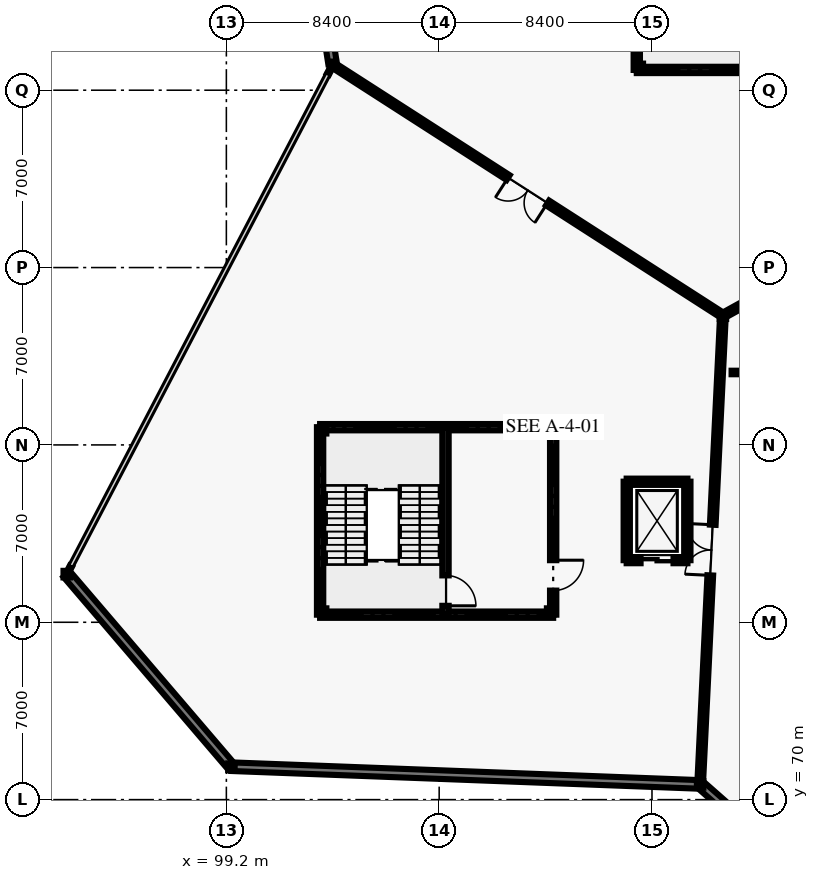
"""IFC4 building model, lengths in metres.
Left out: names, types, materials, properties, quantities, classifications, styles, units other than length and angle.
Written with IfcOpenShell. Run it as: python <this file> out.ifc"""

import sys

from ifc_helpers import new_model, si_unit, direction, frame, frame_2d, origin, origin_2d, place, context, subcontext, project, spatial, rectangle, i_section, extrude, element, fill, save


model = new_model("IFC4")
c1 = context("Model", 3, precision=1e-05, world=origin(), true_north=direction((0.0, 1.0)))
c2 = subcontext(c1, "Body", "Model", "MODEL_VIEW")
j1 = project(units=[si_unit("LENGTHUNIT", "METRE"), si_unit("PLANEANGLEUNIT", "RADIAN")], contexts=[c1])
p1 = place(None, origin())
s1 = spatial("IfcSite", under=j1, at=p1, CompositionType="ELEMENT")
p2 = place(p1, origin())
s2 = spatial("IfcBuilding", under=s1, at=p2, CompositionType="ELEMENT")
p3 = place(p2, frame((0.0, 0.0, 19.8)))
s3 = spatial("IfcBuildingStorey", under=s2, at=p3, CompositionType="ELEMENT", Elevation=19.8)
for number, where, z_axis, x_axis in (
    (1, (92.9, 78.9, 0.0), (0.0, 0.0, 1.0), (1.0, 0.0, 0.0)),
    (2, (99.4, 71.3, 0.0), (0.0, 0.0, 1.0), (1.0, 0.0, 0.0)),
    (3, (103.4, 99.0, 0.0), (0.0, 0.0, 1.0), (1.0, 0.0, 0.0)),
    (4, (117.9, 70.6, 0.0), (0.0, 0.0, 1.0), (1.0, 0.0, 0.0)),
    (5, (118.8, 89.1, 0.0), (0.0, 0.0, 1.0), (1.0, 0.0, 0.0)),
    (6, (103.02, 77.42, 0.0), (0.0, 0.0, 1.0), (1.0, 0.0, 0.0)),
    (7, (111.98, 77.42, 0.0), (0.0, 0.0, 1.0), (1.0, 0.0, 0.0)),
    (8, (111.98, 84.58, 0.0), (0.0, 0.0, 1.0), (1.0, 0.0, 0.0)),
    (9, (103.02, 84.58, 0.0), (0.0, 0.0, 1.0), (1.0, 0.0, 0.0)),
    (10, (115.52, 98.92, 0.0), (0.0, 0.0, 1.0), (1.0, 0.0, 0.0)),
):
    element("IfcColumn", number, at=place(p3, frame(where, z_axis=z_axis, x_axis=x_axis)), inside=s3, PredefinedType="COLUMN", context=c2, shape_type="SweptSolid", body=[
        extrude(i_section(OverallWidth=0.256, OverallDepth=0.26, WebThickness=0.01, FlangeThickness=0.017, FilletRadius=0.013, at=origin_2d()), origin(), (0.0, 0.0, 1.0), 9.0),
    ])
p4 = place(p3, frame((117.84, 70.602, 0.0), z_axis=(0.0, 0.0, 1.0), x_axis=(-0.999284381651, 0.037824920194, 0.0)))
e11 = element("IfcWall", 11, at=p4, inside=s3, PredefinedType="SOLIDWALL", context=c2, shape_type="SweptSolid", body=[
    extrude(rectangle(XDim=18.453, YDim=0.34, at=frame_2d((9.227, 0.0))), origin(), (0.0, 0.0, 1.0), 7.82),
])
for number, where, z_axis, x_axis in (
    (12, (92.919, 78.937, 0.0), (0.0, 0.0, 1.0), (0.464, 0.886, 0.0)),
    (13, (103.21, 98.637, 0.0), (0.0, 0.0, 1.0), (0.464, 0.886, 0.0)),
):
    element("IfcWall", number, at=place(p3, frame(where, z_axis=z_axis, x_axis=x_axis)), inside=s3, PredefinedType="SOLIDWALL", context=c2, shape_type="SweptSolid", body=[
        extrude(rectangle(XDim=0.308, YDim=0.095, at=frame_2d((0.154, 0.0))), origin(), (0.0, 0.0, 1.0), 7.82),
    ])
p5 = place(p3, frame((99.4, 71.3, 0.0), z_axis=(0.0, 0.0, 1.0), x_axis=(-0.649974737731, 0.75995581471, 0.0)))
e14 = element("IfcWall", 14, at=p5, inside=s3, PredefinedType="SOLIDWALL", context=c2, shape_type="SweptSolid", body=[
    extrude(rectangle(XDim=10.0, YDim=0.34, at=frame_2d((5.0, 0.0))), origin(), (0.0, 0.0, 1.0), 7.82),
])
p6 = place(p3, frame((125.5, 63.9, 0.0), z_axis=(0.0, 0.0, 1.0), x_axis=(-0.750131359252, 0.661288850554, 0.0)))
e15 = element("IfcWall", 15, at=p6, inside=s3, PredefinedType="SOLIDWALL", context=c2, shape_type="SweptSolid", body=[
    extrude(rectangle(XDim=10.072, YDim=0.34, at=frame_2d((5.036, 0.0))), origin(), (0.0, 0.0, 1.0), 7.82),
])
p7 = place(p3, frame((103.391, 99.059, 0.0), z_axis=(0.0, 0.0, 1.0), x_axis=(-0.153783616147, 0.988104548823, 0.0)))
e16 = element("IfcWall", 16, at=p7, inside=s3, PredefinedType="SOLIDWALL", context=c2, shape_type="SweptSolid", body=[
    extrude(rectangle(XDim=4.494, YDim=0.34, at=frame_2d((2.247, 0.0))), origin(), (0.0, 0.0, 1.0), 7.82),
])
p8 = place(p3, frame((117.9, 70.6, 0.0), z_axis=(0.0, 0.0, 1.0), x_axis=(0.048599072515, 0.998818366947, 0.0)))
e17 = element("IfcWall", 17, at=p8, inside=s3, PredefinedType="SOLIDWALL", context=c2, shape_type="SweptSolid", body=[
    extrude(rectangle(XDim=18.522, YDim=0.225, at=frame_2d((9.261, 0.0))), origin(), (0.0, 0.0, 1.0), 8.22),
])
p9 = place(p8, frame((8.261, 0.0, 0.0)))
e18 = element("IfcOpeningElement", 18, at=p9, cuts=e17, PredefinedType="OPENING", context=c2, shape_type="SweptSolid", body=[
    extrude(rectangle(XDim=2.0, YDim=2.5, at=frame_2d((1.0, 1.25))), frame((0.0, 0.123, 0.0), z_axis=(0.0, -1.0, 0.0), x_axis=(1.0, 0.0, 0.0)), (0.0, 0.0, 1.0), 0.245),
])
p10 = place(p3, frame((118.8, 89.1, 0.0), z_axis=(0.0, 0.0, 1.0), x_axis=(-0.841183241423, 0.540750177392, 0.0)))
e19 = element("IfcWall", 19, at=p10, inside=s3, PredefinedType="SOLIDWALL", context=c2, shape_type="SweptSolid", body=[
    extrude(rectangle(XDim=18.308, YDim=0.225, at=frame_2d((9.154, 0.0))), origin(), (0.0, 0.0, 1.0), 8.22),
])
p11 = place(p10, frame((8.229, 0.0, 0.0)))
e20 = element("IfcOpeningElement", 20, at=p11, cuts=e19, PredefinedType="OPENING", context=c2, shape_type="SweptSolid", body=[
    extrude(rectangle(XDim=1.85, YDim=2.4, at=frame_2d((0.925, 1.2))), frame((0.0, 0.123, 0.0), z_axis=(0.0, -1.0, 0.0), x_axis=(1.0, 0.0, 0.0)), (0.0, 0.0, 1.0), 0.245),
])
p12 = place(p3, frame((134.9, 98.0, 0.0), z_axis=(0.0, 0.0, 1.0), x_axis=(-0.875181353329, -0.483794996652, 0.0)))
e21 = element("IfcWall", 21, at=p12, inside=s3, PredefinedType="SOLIDWALL", context=c2, shape_type="SweptSolid", body=[
    extrude(rectangle(XDim=18.396, YDim=0.225, at=frame_2d((9.198, 0.0))), origin(), (0.0, 0.0, 1.0), 8.22),
])
p13 = place(p12, frame((8.098, 0.0, 0.0)))
e22 = element("IfcOpeningElement", 22, at=p13, cuts=e21, PredefinedType="OPENING", context=c2, shape_type="SweptSolid", body=[
    extrude(rectangle(XDim=2.2, YDim=2.6, at=frame_2d((1.1, 1.3))), frame((0.0, 0.123, 0.0), z_axis=(0.0, -1.0, 0.0), x_axis=(1.0, 0.0, 0.0)), (0.0, 0.0, 1.0), 0.245),
])
p14 = place(p3, frame((119.142, 86.859, 0.0), z_axis=(0.0, 0.0, 1.0), x_axis=(1.0, 0.0, 0.0)))
e23 = element("IfcWall", 23, at=p14, inside=s3, PredefinedType="PARTITIONING", context=c2, shape_type="SweptSolid", body=[
    extrude(rectangle(XDim=6.858, YDim=0.14, at=frame_2d((3.429, 0.0))), origin(), (0.0, 0.0, 1.0), 7.52),
])
p15 = place(p14, frame((2.939, 0.0, 0.0)))
e24 = element("IfcOpeningElement", 24, at=p15, cuts=e23, PredefinedType="OPENING", context=c2, shape_type="SweptSolid", body=[
    extrude(rectangle(XDim=0.98, YDim=2.15, at=frame_2d((0.49, 1.075))), frame((0.0, 0.08, 0.0), z_axis=(0.0, -1.0, 0.0), x_axis=(1.0, 0.0, 0.0)), (0.0, 0.0, 1.0), 0.16),
])
p16 = place(p3, frame((102.9, 77.3, 0.0), z_axis=(0.0, 0.0, 1.0), x_axis=(0.0, 1.0, 0.0)))
e25 = element("IfcWall", 25, at=p16, inside=s3, PredefinedType="SHEAR", context=c2, shape_type="SweptSolid", body=[
    extrude(rectangle(XDim=7.4, YDim=0.25, at=frame_2d((3.7, 0.0))), origin(), (0.0, 0.0, 1.0), 8.76),
])
for number, where, z_axis, x_axis in (
    (26, (102.9, 84.7, 0.0), (0.0, 0.0, 1.0), (1.0, 0.0, 0.0)),
    (27, (112.1, 77.3, 0.0), (0.0, 0.0, 1.0), (-1.0, 0.0, 0.0)),
):
    element("IfcWall", number, at=place(p3, frame(where, z_axis=z_axis, x_axis=x_axis)), inside=s3, PredefinedType="SHEAR", context=c2, shape_type="SweptSolid", body=[
        extrude(rectangle(XDim=9.2, YDim=0.25, at=frame_2d((4.6, 0.0))), origin(), (0.0, 0.0, 1.0), 8.76),
    ])
p17 = place(p3, frame((112.1, 84.7, 0.0), z_axis=(0.0, 0.0, 1.0), x_axis=(0.0, -1.0, 0.0)))
e28 = element("IfcWall", 28, at=p17, inside=s3, PredefinedType="SHEAR", context=c2, shape_type="SweptSolid", body=[
    extrude(rectangle(XDim=7.4, YDim=0.25, at=frame_2d((3.7, 0.0))), origin(), (0.0, 0.0, 1.0), 8.76),
])
p18 = place(p17, frame((5.25, 0.0, 0.0)))
e29 = element("IfcOpeningElement", 29, at=p18, cuts=e28, PredefinedType="OPENING", context=c2, shape_type="SweptSolid", body=[
    extrude(rectangle(XDim=1.2, YDim=2.2, at=frame_2d((0.6, 1.1))), frame((0.0, 0.135, 0.0), z_axis=(0.0, -1.0, 0.0), x_axis=(1.0, 0.0, 0.0)), (0.0, 0.0, 1.0), 0.27),
])
p19 = place(p3, frame((107.85, 84.7, 0.0), z_axis=(0.0, 0.0, 1.0), x_axis=(0.0, -1.0, 0.0)))
e30 = element("IfcWall", 30, at=p19, inside=s3, PredefinedType="SHEAR", context=c2, shape_type="SweptSolid", body=[
    extrude(rectangle(XDim=7.4, YDim=0.25, at=frame_2d((3.7, 0.0))), origin(), (0.0, 0.0, 1.0), 8.76),
])
p20 = place(p19, frame((5.85, 0.0, 0.0)))
e31 = element("IfcOpeningElement", 31, at=p20, cuts=e30, PredefinedType="OPENING", context=c2, shape_type="SweptSolid", body=[
    extrude(rectangle(XDim=1.2, YDim=2.2, at=frame_2d((0.6, 1.1))), frame((0.0, 0.135, 0.0), z_axis=(0.0, -1.0, 0.0), x_axis=(1.0, 0.0, 0.0)), (0.0, 0.0, 1.0), 0.27),
])
p21 = place(p3, frame((115.4, 98.8, 0.0), z_axis=(0.0, 0.0, 1.0), x_axis=(0.0, 1.0, 0.0)))
e32 = element("IfcWall", 32, at=p21, inside=s3, PredefinedType="SHEAR", context=c2, shape_type="SweptSolid", body=[
    extrude(rectangle(XDim=7.4, YDim=0.25, at=frame_2d((3.7, 0.0))), origin(), (0.0, 0.0, 1.0), 8.76),
])
p22 = place(p3, frame((124.6, 98.8, 0.0), z_axis=(0.0, 0.0, 1.0), x_axis=(-1.0, 0.0, 0.0)))
e33 = element("IfcWall", 33, at=p22, inside=s3, PredefinedType="SHEAR", context=c2, shape_type="SweptSolid", body=[
    extrude(rectangle(XDim=9.2, YDim=0.25, at=frame_2d((4.6, 0.0))), origin(), (0.0, 0.0, 1.0), 8.76),
])
p23 = place(p3, frame((115.0, 82.55, 0.0), z_axis=(0.0, 0.0, 1.0), x_axis=(1.0, 0.0, 0.0)))
e34 = element("IfcWall", 34, at=p23, inside=s3, PredefinedType="SHEAR", context=c2, shape_type="SweptSolid", body=[
    extrude(rectangle(XDim=2.4, YDim=0.24, at=frame_2d((1.2, 0.0))), origin(), (0.0, 0.0, 1.0), 8.76),
])
for number, where, z_axis, x_axis in (
    (35, (117.4, 82.55, 0.0), (0.0, 0.0, 1.0), (0.0, -1.0, 0.0)),
    (36, (115.0, 79.45, 0.0), (0.0, 0.0, 1.0), (0.0, 1.0, 0.0)),
):
    element("IfcWall", number, at=place(p3, frame(where, z_axis=z_axis, x_axis=x_axis)), inside=s3, PredefinedType="SHEAR", context=c2, shape_type="SweptSolid", body=[
        extrude(rectangle(XDim=3.1, YDim=0.24, at=frame_2d((1.55, 0.0))), origin(), (0.0, 0.0, 1.0), 8.76),
    ])
p24 = place(p3, frame((117.4, 79.45, 0.0), z_axis=(0.0, 0.0, 1.0), x_axis=(-1.0, 0.0, 0.0)))
e37 = element("IfcWall", 37, at=p24, inside=s3, PredefinedType="SHEAR", context=c2, shape_type="SweptSolid", body=[
    extrude(rectangle(XDim=2.4, YDim=0.24, at=frame_2d((1.2, 0.0))), origin(), (0.0, 0.0, 1.0), 8.76),
])
p25 = place(p24, frame((0.55, 0.0, 0.0)))
e38 = element("IfcOpeningElement", 38, at=p25, cuts=e37, PredefinedType="OPENING", context=c2, shape_type="SweptSolid", body=[
    extrude(rectangle(XDim=1.3, YDim=2.25, at=frame_2d((0.65, 1.125))), frame((0.0, 0.13, 0.0), z_axis=(0.0, -1.0, 0.0), x_axis=(1.0, 0.0, 0.0)), (0.0, 0.0, 1.0), 0.26),
])
p26 = place(p9, origin())
e39 = element("IfcDoor", 39, at=p26, inside=s3, OperationType="DOUBLE_DOOR_SINGLE_SWING", PredefinedType="DOOR", context=c2, shape_type="SweptSolid", body=[
    extrude(rectangle(XDim=2.0, YDim=2.5, at=frame_2d((1.0, 1.25))), frame((0.0, 0.025, 0.0), z_axis=(0.0, -1.0, 0.0), x_axis=(1.0, 0.0, 0.0)), (0.0, 0.0, 1.0), 0.05),
])
fill(e18, e39)
p27 = place(p11, origin())
e40 = element("IfcDoor", 40, at=p27, inside=s3, OperationType="DOUBLE_DOOR_SINGLE_SWING", PredefinedType="DOOR", context=c2, shape_type="SweptSolid", body=[
    extrude(rectangle(XDim=1.85, YDim=2.4, at=frame_2d((0.925, 1.2))), frame((0.0, 0.025, 0.0), z_axis=(0.0, -1.0, 0.0), x_axis=(1.0, 0.0, 0.0)), (0.0, 0.0, 1.0), 0.05),
])
fill(e20, e40)
p28 = place(p18, origin())
e41 = element("IfcDoor", 41, at=p28, inside=s3, OperationType="SINGLE_SWING_LEFT", PredefinedType="DOOR", context=c2, shape_type="SweptSolid", body=[
    extrude(rectangle(XDim=1.2, YDim=2.2, at=frame_2d((0.6, 1.1))), frame((0.0, 0.025, 0.0), z_axis=(0.0, -1.0, 0.0), x_axis=(1.0, 0.0, 0.0)), (0.0, 0.0, 1.0), 0.05),
])
fill(e29, e41)
p29 = place(p20, origin())
e42 = element("IfcDoor", 42, at=p29, inside=s3, OperationType="SINGLE_SWING_RIGHT", PredefinedType="DOOR", context=c2, shape_type="SweptSolid", body=[
    extrude(rectangle(XDim=1.2, YDim=2.2, at=frame_2d((0.6, 1.1))), frame((0.0, 0.025, 0.0), z_axis=(0.0, -1.0, 0.0), x_axis=(1.0, 0.0, 0.0)), (0.0, 0.0, 1.0), 0.05),
])
fill(e31, e42)
p30 = place(p25, origin())
e43 = element("IfcDoor", 43, at=p30, inside=s3, OperationType="SLIDING_TO_LEFT", PredefinedType="DOOR", context=c2, shape_type="SweptSolid", body=[
    extrude(rectangle(XDim=1.3, YDim=2.25, at=frame_2d((0.65, 1.125))), frame((0.0, 0.025, 0.0), z_axis=(0.0, -1.0, 0.0), x_axis=(1.0, 0.0, 0.0)), (0.0, 0.0, 1.0), 0.05),
])
fill(e38, e43)
save(model, sys.argv[1])
